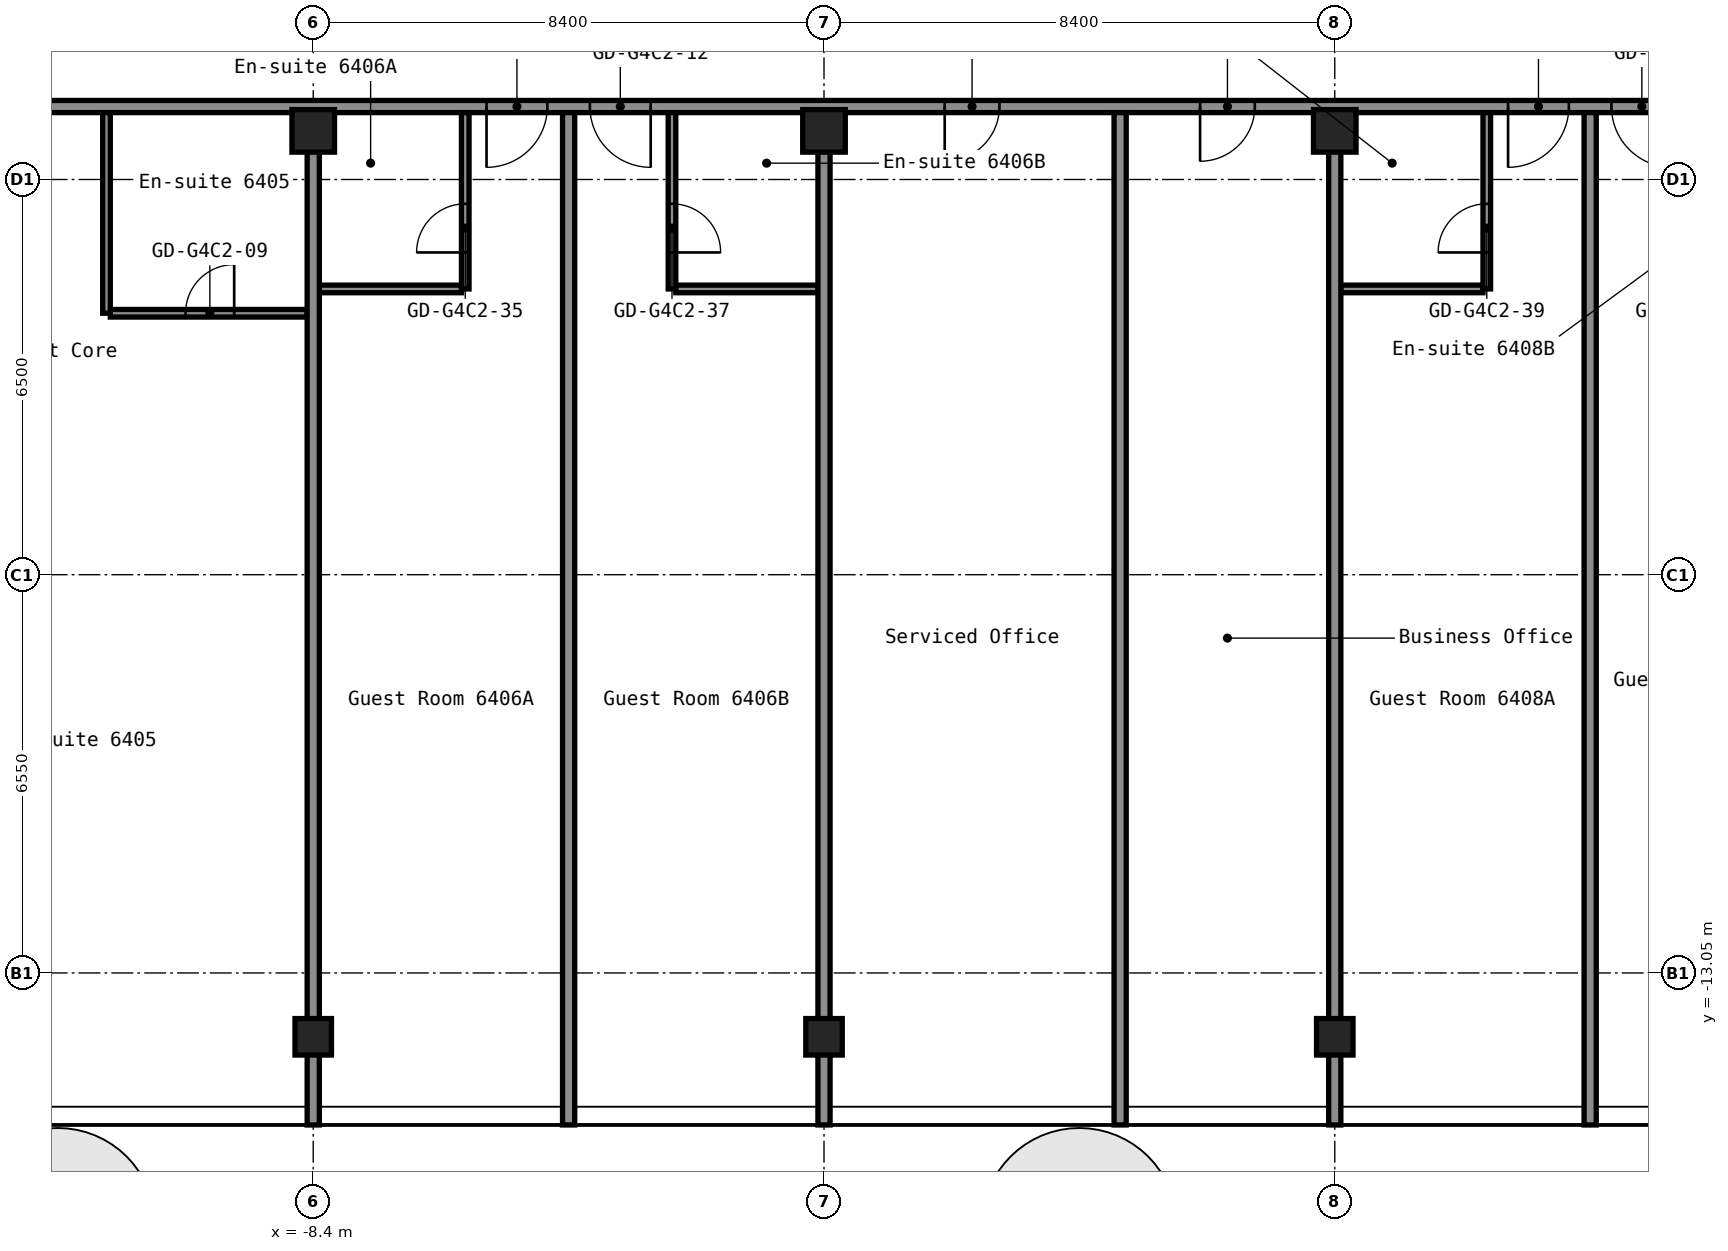
"""IFC4 building model, lengths in metres.
Left out: names, types, materials, properties, quantities, classifications, styles, units other than length and angle.
Written with IfcOpenShell. Run it as: python <this file> out.ifc"""

import sys

from ifc_helpers import new_model, si_unit, direction, frame, frame_2d, origin, origin_2d, place, context, subcontext, project, spatial, rectangle, hollow_rectangle, extrude, element, fill, save


model = new_model("IFC4")
c1 = context("Model", 3, precision=1e-05, world=origin(), true_north=direction((0.0, 1.0)))
c2 = subcontext(c1, "Body", "Model", "MODEL_VIEW")
j1 = project(units=[si_unit("LENGTHUNIT", "METRE"), si_unit("PLANEANGLEUNIT", "RADIAN")], contexts=[c1])
p1 = place(None, origin())
s1 = spatial("IfcSite", under=j1, at=p1, CompositionType="ELEMENT")
p2 = place(p1, origin())
s2 = spatial("IfcBuilding", under=s1, at=p2, CompositionType="ELEMENT")
p3 = place(p2, frame((0.0, 0.0, 225.0)))
s3 = spatial("IfcBuildingStorey", under=s2, at=p3, CompositionType="ELEMENT", Elevation=225.0)
p4 = place(p3, frame((-8.4, -14.1, 0.0), z_axis=(0.0, 0.0, 1.0), x_axis=(1.0, 0.0, 0.0)))
e1 = element("IfcColumn", 1, at=p4, inside=s3, PredefinedType="COLUMN", context=c2, shape_type="SweptSolid", body=[
    extrude(hollow_rectangle(XDim=0.6, YDim=0.6, WallThickness=0.025, InnerFilletRadius=0.038, OuterFilletRadius=0.062, at=origin_2d()), origin(), (0.0, 0.0, 1.0), 2.9),
])
p5 = place(p3, frame((-8.4, 0.8, 0.0), z_axis=(0.0, 0.0, 1.0), x_axis=(1.0, 0.0, 0.0)))
e2 = element("IfcColumn", 2, at=p5, inside=s3, PredefinedType="COLUMN", context=c2, shape_type="SweptSolid", body=[
    extrude(hollow_rectangle(XDim=0.7, YDim=0.7, WallThickness=0.028, at=origin_2d()), origin(), (0.0, 0.0, 1.0), 2.9),
])
p6 = place(p3, frame((0.0, -14.1, 0.0), z_axis=(0.0, 0.0, 1.0), x_axis=(1.0, 0.0, 0.0)))
e3 = element("IfcColumn", 3, at=p6, inside=s3, PredefinedType="COLUMN", context=c2, shape_type="SweptSolid", body=[
    extrude(hollow_rectangle(XDim=0.6, YDim=0.6, WallThickness=0.025, InnerFilletRadius=0.038, OuterFilletRadius=0.062, at=origin_2d()), origin(), (0.0, 0.0, 1.0), 2.9),
])
p7 = place(p3, frame((0.0, 0.8, 0.0), z_axis=(0.0, 0.0, 1.0), x_axis=(1.0, 0.0, 0.0)))
e4 = element("IfcColumn", 4, at=p7, inside=s3, PredefinedType="COLUMN", context=c2, shape_type="SweptSolid", body=[
    extrude(hollow_rectangle(XDim=0.7, YDim=0.7, WallThickness=0.028, at=origin_2d()), origin(), (0.0, 0.0, 1.0), 2.9),
])
p8 = place(p3, frame((8.4, -14.1, 0.0), z_axis=(0.0, 0.0, 1.0), x_axis=(1.0, 0.0, 0.0)))
e5 = element("IfcColumn", 5, at=p8, inside=s3, PredefinedType="COLUMN", context=c2, shape_type="SweptSolid", body=[
    extrude(hollow_rectangle(XDim=0.6, YDim=0.6, WallThickness=0.025, InnerFilletRadius=0.038, OuterFilletRadius=0.062, at=origin_2d()), origin(), (0.0, 0.0, 1.0), 2.9),
])
p9 = place(p3, frame((8.4, 0.8, 0.0), z_axis=(0.0, 0.0, 1.0), x_axis=(1.0, 0.0, 0.0)))
e6 = element("IfcColumn", 6, at=p9, inside=s3, PredefinedType="COLUMN", context=c2, shape_type="SweptSolid", body=[
    extrude(hollow_rectangle(XDim=0.7, YDim=0.7, WallThickness=0.028, at=origin_2d()), origin(), (0.0, 0.0, 1.0), 2.9),
])
p10 = place(p3, frame((-11.738, -2.2, 0.0), z_axis=(0.0, 0.0, 1.0), x_axis=(1.0, 0.0, 0.0)))
e7 = element("IfcWall", 7, at=p10, inside=s3, PredefinedType="PARTITIONING", context=c2, shape_type="SweptSolid", body=[
    extrude(rectangle(XDim=3.238, YDim=0.125, at=frame_2d((1.619, 0.0))), origin(), (0.0, 0.0, 1.0), 2.9),
])
p11 = place(p10, frame((1.238, 0.0, 0.0)))
e8 = element("IfcOpeningElement", 8, at=p11, cuts=e7, PredefinedType="OPENING", context=c2, shape_type="SweptSolid", body=[
    extrude(rectangle(XDim=0.8, YDim=2.1, at=frame_2d((0.4, 1.05))), frame((0.0, 0.073, 0.0), z_axis=(0.0, -1.0, 0.0), x_axis=(1.0, 0.0, 0.0)), (0.0, 0.0, 1.0), 0.145),
])
p12 = place(p3, frame((-8.3, -1.8, 0.0), z_axis=(0.0, 0.0, 1.0), x_axis=(1.0, 0.0, 0.0)))
e9 = element("IfcWall", 9, at=p12, inside=s3, PredefinedType="PARTITIONING", context=c2, shape_type="SweptSolid", body=[
    extrude(rectangle(XDim=2.338, YDim=0.125, at=frame_2d((1.169, 0.0))), origin(), (0.0, 0.0, 1.0), 2.9),
])
for number, where, z_axis, x_axis in (
    (10, (-2.438, -1.8, 0.0), (0.0, 0.0, 1.0), (1.0, 0.0, 0.0)),
    (11, (8.5, -1.8, 0.0), (0.0, 0.0, 1.0), (1.0, 0.0, 0.0)),
):
    element("IfcWall", number, at=place(p3, frame(where, z_axis=z_axis, x_axis=x_axis)), inside=s3, PredefinedType="PARTITIONING", context=c2, shape_type="SweptSolid", body=[
        extrude(rectangle(XDim=2.337, YDim=0.125, at=frame_2d((1.169, 0.0))), origin(), (0.0, 0.0, 1.0), 2.9),
    ])
p13 = place(p3, frame((-16.8, 1.2, 0.0), z_axis=(0.0, 0.0, 1.0), x_axis=(1.0, 0.0, 0.0)))
e12 = element("IfcWall", 12, at=p13, inside=s3, PredefinedType="PARTITIONING", context=c2, shape_type="SweptSolid", body=[
    extrude(rectangle(XDim=33.6, YDim=0.2, at=frame_2d((16.8, 0.0))), origin(), (0.0, 0.0, 1.0), 2.9),
])
p14 = place(p13, frame((2.0, 0.0, 0.0)))
e13 = element("IfcOpeningElement", 13, at=p14, cuts=e12, PredefinedType="OPENING", context=c2, shape_type="SweptSolid", body=[
    extrude(rectangle(XDim=1.0, YDim=2.1, at=frame_2d((0.5, 1.05))), frame((0.0, 0.11, 0.0), z_axis=(0.0, -1.0, 0.0), x_axis=(1.0, 0.0, 0.0)), (0.0, 0.0, 1.0), 0.22),
])
p15 = place(p13, frame((11.25, 0.0, 0.0)))
e14 = element("IfcOpeningElement", 14, at=p15, cuts=e12, PredefinedType="OPENING", context=c2, shape_type="SweptSolid", body=[
    extrude(rectangle(XDim=1.0, YDim=2.1, at=frame_2d((0.5, 1.05))), frame((0.0, 0.11, 0.0), z_axis=(0.0, -1.0, 0.0), x_axis=(1.0, 0.0, 0.0)), (0.0, 0.0, 1.0), 0.22),
])
p16 = place(p13, frame((12.95, 0.0, 0.0)))
e15 = element("IfcOpeningElement", 15, at=p16, cuts=e12, PredefinedType="OPENING", context=c2, shape_type="SweptSolid", body=[
    extrude(rectangle(XDim=1.0, YDim=2.1, at=frame_2d((0.5, 1.05))), frame((0.0, 0.11, 0.0), z_axis=(0.0, -1.0, 0.0), x_axis=(1.0, 0.0, 0.0)), (0.0, 0.0, 1.0), 0.22),
])
p17 = place(p13, frame((18.785, 0.0, 0.0)))
e16 = element("IfcOpeningElement", 16, at=p17, cuts=e12, PredefinedType="OPENING", context=c2, shape_type="SweptSolid", body=[
    extrude(rectangle(XDim=0.9, YDim=2.1, at=frame_2d((0.45, 1.05))), frame((0.0, 0.11, 0.0), z_axis=(0.0, -1.0, 0.0), x_axis=(1.0, 0.0, 0.0)), (0.0, 0.0, 1.0), 0.22),
])
p18 = place(p13, frame((22.985, 0.0, 0.0)))
e17 = element("IfcOpeningElement", 17, at=p18, cuts=e12, PredefinedType="OPENING", context=c2, shape_type="SweptSolid", body=[
    extrude(rectangle(XDim=0.9, YDim=2.1, at=frame_2d((0.45, 1.05))), frame((0.0, 0.11, 0.0), z_axis=(0.0, -1.0, 0.0), x_axis=(1.0, 0.0, 0.0)), (0.0, 0.0, 1.0), 0.22),
])
p19 = place(p13, frame((28.05, 0.0, 0.0)))
e18 = element("IfcOpeningElement", 18, at=p19, cuts=e12, PredefinedType="OPENING", context=c2, shape_type="SweptSolid", body=[
    extrude(rectangle(XDim=1.0, YDim=2.1, at=frame_2d((0.5, 1.05))), frame((0.0, 0.11, 0.0), z_axis=(0.0, -1.0, 0.0), x_axis=(1.0, 0.0, 0.0)), (0.0, 0.0, 1.0), 0.22),
])
p20 = place(p13, frame((29.75, 0.0, 0.0)))
e19 = element("IfcOpeningElement", 19, at=p20, cuts=e12, PredefinedType="OPENING", context=c2, shape_type="SweptSolid", body=[
    extrude(rectangle(XDim=1.0, YDim=2.1, at=frame_2d((0.5, 1.05))), frame((0.0, 0.11, 0.0), z_axis=(0.0, -1.0, 0.0), x_axis=(1.0, 0.0, 0.0)), (0.0, 0.0, 1.0), 0.22),
])
p21 = place(p3, frame((-11.8, -2.2, 0.0), z_axis=(0.0, 0.0, 1.0), x_axis=(0.0, 1.0, 0.0)))
e20 = element("IfcWall", 20, at=p21, inside=s3, PredefinedType="PARTITIONING", context=c2, shape_type="SweptSolid", body=[
    extrude(rectangle(XDim=3.3, YDim=0.125, at=frame_2d((1.65, 0.0))), origin(), (0.0, 0.0, 1.0), 2.9),
])
p22 = place(p3, frame((-8.4, -15.55, 0.0), z_axis=(0.0, 0.0, 1.0), x_axis=(0.0, 1.0, 0.0)))
e21 = element("IfcWall", 21, at=p22, inside=s3, PredefinedType="PARTITIONING", context=c2, shape_type="SweptSolid", body=[
    extrude(rectangle(XDim=16.01, YDim=0.2, at=frame_2d((8.005, 0.0))), origin(), (0.0, 0.0, 1.0), 2.9),
])
p23 = place(p3, frame((-5.9, -1.8, 0.0), z_axis=(0.0, 0.0, 1.0), x_axis=(0.0, 1.0, 0.0)))
e22 = element("IfcWall", 22, at=p23, inside=s3, PredefinedType="PARTITIONING", context=c2, shape_type="SweptSolid", body=[
    extrude(rectangle(XDim=2.9, YDim=0.125, at=frame_2d((1.45, 0.0))), origin(), (0.0, 0.0, 1.0), 2.9),
])
p24 = place(p23, frame((0.6, 0.0, 0.0)))
e23 = element("IfcOpeningElement", 23, at=p24, cuts=e22, PredefinedType="OPENING", context=c2, shape_type="SweptSolid", body=[
    extrude(rectangle(XDim=0.8, YDim=2.1, at=frame_2d((0.4, 1.05))), frame((0.0, 0.073, 0.0), z_axis=(0.0, -1.0, 0.0), x_axis=(1.0, 0.0, 0.0)), (0.0, 0.0, 1.0), 0.145),
])
p25 = place(p3, frame((-4.2, -15.55, 0.0), z_axis=(0.0, 0.0, 1.0), x_axis=(0.0, 1.0, 0.0)))
e24 = element("IfcWall", 24, at=p25, inside=s3, PredefinedType="PARTITIONING", context=c2, shape_type="SweptSolid", body=[
    extrude(rectangle(XDim=16.65, YDim=0.2, at=frame_2d((8.325, 0.0))), origin(), (0.0, 0.0, 1.0), 2.9),
])
p26 = place(p3, frame((-2.5, -1.8, 0.0), z_axis=(0.0, 0.0, 1.0), x_axis=(0.0, 1.0, 0.0)))
e25 = element("IfcWall", 25, at=p26, inside=s3, PredefinedType="PARTITIONING", context=c2, shape_type="SweptSolid", body=[
    extrude(rectangle(XDim=2.9, YDim=0.125, at=frame_2d((1.45, 0.0))), origin(), (0.0, 0.0, 1.0), 2.9),
])
p27 = place(p26, frame((0.6, 0.0, 0.0)))
e26 = element("IfcOpeningElement", 26, at=p27, cuts=e25, PredefinedType="OPENING", context=c2, shape_type="SweptSolid", body=[
    extrude(rectangle(XDim=0.8, YDim=2.1, at=frame_2d((0.4, 1.05))), frame((0.0, 0.073, 0.0), z_axis=(0.0, -1.0, 0.0), x_axis=(1.0, 0.0, 0.0)), (0.0, 0.0, 1.0), 0.145),
])
p28 = place(p3, frame((0.0, -15.55, 0.0), z_axis=(0.0, 0.0, 1.0), x_axis=(0.0, 1.0, 0.0)))
e27 = element("IfcWall", 27, at=p28, inside=s3, PredefinedType="PARTITIONING", context=c2, shape_type="SweptSolid", body=[
    extrude(rectangle(XDim=16.01, YDim=0.2, at=frame_2d((8.005, 0.0))), origin(), (0.0, 0.0, 1.0), 2.9),
])
p29 = place(p3, frame((4.87, -15.55, 0.0), z_axis=(0.0, 0.0, 1.0), x_axis=(0.0, 1.0, 0.0)))
e28 = element("IfcWall", 28, at=p29, inside=s3, PredefinedType="PARTITIONING", context=c2, shape_type="SweptSolid", body=[
    extrude(rectangle(XDim=16.65, YDim=0.2, at=frame_2d((8.325, 0.0))), origin(), (0.0, 0.0, 1.0), 2.9),
])
p30 = place(p3, frame((8.4, -15.55, 0.0), z_axis=(0.0, 0.0, 1.0), x_axis=(0.0, 1.0, 0.0)))
e29 = element("IfcWall", 29, at=p30, inside=s3, PredefinedType="PARTITIONING", context=c2, shape_type="SweptSolid", body=[
    extrude(rectangle(XDim=16.01, YDim=0.2, at=frame_2d((8.005, 0.0))), origin(), (0.0, 0.0, 1.0), 2.9),
])
p31 = place(p3, frame((10.9, -1.8, 0.0), z_axis=(0.0, 0.0, 1.0), x_axis=(0.0, 1.0, 0.0)))
e30 = element("IfcWall", 30, at=p31, inside=s3, PredefinedType="PARTITIONING", context=c2, shape_type="SweptSolid", body=[
    extrude(rectangle(XDim=2.9, YDim=0.125, at=frame_2d((1.45, 0.0))), origin(), (0.0, 0.0, 1.0), 2.9),
])
p32 = place(p31, frame((0.6, 0.0, 0.0)))
e31 = element("IfcOpeningElement", 31, at=p32, cuts=e30, PredefinedType="OPENING", context=c2, shape_type="SweptSolid", body=[
    extrude(rectangle(XDim=0.8, YDim=2.1, at=frame_2d((0.4, 1.05))), frame((0.0, 0.073, 0.0), z_axis=(0.0, -1.0, 0.0), x_axis=(1.0, 0.0, 0.0)), (0.0, 0.0, 1.0), 0.145),
])
p33 = place(p3, frame((12.6, -15.55, 0.0), z_axis=(0.0, 0.0, 1.0), x_axis=(0.0, 1.0, 0.0)))
e32 = element("IfcWall", 32, at=p33, inside=s3, PredefinedType="PARTITIONING", context=c2, shape_type="SweptSolid", body=[
    extrude(rectangle(XDim=16.65, YDim=0.2, at=frame_2d((8.325, 0.0))), origin(), (0.0, 0.0, 1.0), 2.9),
])
p34 = place(p11, origin())
e33 = element("IfcDoor", 33, at=p34, inside=s3, OperationType="SINGLE_SWING_LEFT", PredefinedType="DOOR", context=c2, shape_type="SweptSolid", body=[
    extrude(rectangle(XDim=0.8, YDim=2.1, at=frame_2d((0.4, 1.05))), frame((0.0, 0.025, 0.0), z_axis=(0.0, -1.0, 0.0), x_axis=(1.0, 0.0, 0.0)), (0.0, 0.0, 1.0), 0.05),
])
fill(e8, e33)
p35 = place(p15, origin())
e34 = element("IfcDoor", 34, at=p35, inside=s3, OperationType="SINGLE_SWING_LEFT", PredefinedType="DOOR", context=c2, shape_type="SweptSolid", body=[
    extrude(rectangle(XDim=1.0, YDim=2.1, at=frame_2d((0.5, 1.05))), frame((0.0, 0.025, 0.0), z_axis=(0.0, -1.0, 0.0), x_axis=(1.0, 0.0, 0.0)), (0.0, 0.0, 1.0), 0.05),
])
fill(e14, e34)
p36 = place(p16, origin())
e35 = element("IfcDoor", 35, at=p36, inside=s3, OperationType="SINGLE_SWING_RIGHT", PredefinedType="DOOR", context=c2, shape_type="SweptSolid", body=[
    extrude(rectangle(XDim=1.0, YDim=2.1, at=frame_2d((0.5, 1.05))), frame((0.0, 0.025, 0.0), z_axis=(0.0, -1.0, 0.0), x_axis=(1.0, 0.0, 0.0)), (0.0, 0.0, 1.0), 0.05),
])
fill(e15, e35)
p37 = place(p17, origin())
e36 = element("IfcDoor", 36, at=p37, inside=s3, OperationType="SINGLE_SWING_LEFT", PredefinedType="DOOR", context=c2, shape_type="SweptSolid", body=[
    extrude(rectangle(XDim=0.9, YDim=2.1, at=frame_2d((0.45, 1.05))), frame((0.0, 0.025, 0.0), z_axis=(0.0, -1.0, 0.0), x_axis=(1.0, 0.0, 0.0)), (0.0, 0.0, 1.0), 0.05),
])
fill(e16, e36)
p38 = place(p18, origin())
e37 = element("IfcDoor", 37, at=p38, inside=s3, OperationType="SINGLE_SWING_LEFT", PredefinedType="DOOR", context=c2, shape_type="SweptSolid", body=[
    extrude(rectangle(XDim=0.9, YDim=2.1, at=frame_2d((0.45, 1.05))), frame((0.0, 0.025, 0.0), z_axis=(0.0, -1.0, 0.0), x_axis=(1.0, 0.0, 0.0)), (0.0, 0.0, 1.0), 0.05),
])
fill(e17, e37)
p39 = place(p19, origin())
e38 = element("IfcDoor", 38, at=p39, inside=s3, OperationType="SINGLE_SWING_LEFT", PredefinedType="DOOR", context=c2, shape_type="SweptSolid", body=[
    extrude(rectangle(XDim=1.0, YDim=2.1, at=frame_2d((0.5, 1.05))), frame((0.0, 0.025, 0.0), z_axis=(0.0, -1.0, 0.0), x_axis=(1.0, 0.0, 0.0)), (0.0, 0.0, 1.0), 0.05),
])
fill(e18, e38)
p40 = place(p20, origin())
e39 = element("IfcDoor", 39, at=p40, inside=s3, OperationType="SINGLE_SWING_RIGHT", PredefinedType="DOOR", context=c2, shape_type="SweptSolid", body=[
    extrude(rectangle(XDim=1.0, YDim=2.1, at=frame_2d((0.5, 1.05))), frame((0.0, 0.025, 0.0), z_axis=(0.0, -1.0, 0.0), x_axis=(1.0, 0.0, 0.0)), (0.0, 0.0, 1.0), 0.05),
])
fill(e19, e39)
p41 = place(p24, origin())
e40 = element("IfcDoor", 40, at=p41, inside=s3, OperationType="SINGLE_SWING_RIGHT", PredefinedType="DOOR", context=c2, shape_type="SweptSolid", body=[
    extrude(rectangle(XDim=0.8, YDim=2.1, at=frame_2d((0.4, 1.05))), frame((0.0, 0.025, 0.0), z_axis=(0.0, -1.0, 0.0), x_axis=(1.0, 0.0, 0.0)), (0.0, 0.0, 1.0), 0.05),
])
fill(e23, e40)
p42 = place(p27, origin())
e41 = element("IfcDoor", 41, at=p42, inside=s3, OperationType="SINGLE_SWING_LEFT", PredefinedType="DOOR", context=c2, shape_type="SweptSolid", body=[
    extrude(rectangle(XDim=0.8, YDim=2.1, at=frame_2d((0.4, 1.05))), frame((0.0, 0.025, 0.0), z_axis=(0.0, -1.0, 0.0), x_axis=(1.0, 0.0, 0.0)), (0.0, 0.0, 1.0), 0.05),
])
fill(e26, e41)
p43 = place(p32, origin())
e42 = element("IfcDoor", 42, at=p43, inside=s3, OperationType="SINGLE_SWING_RIGHT", PredefinedType="DOOR", context=c2, shape_type="SweptSolid", body=[
    extrude(rectangle(XDim=0.8, YDim=2.1, at=frame_2d((0.4, 1.05))), frame((0.0, 0.025, 0.0), z_axis=(0.0, -1.0, 0.0), x_axis=(1.0, 0.0, 0.0)), (0.0, 0.0, 1.0), 0.05),
])
fill(e31, e42)
save(model, sys.argv[1])
